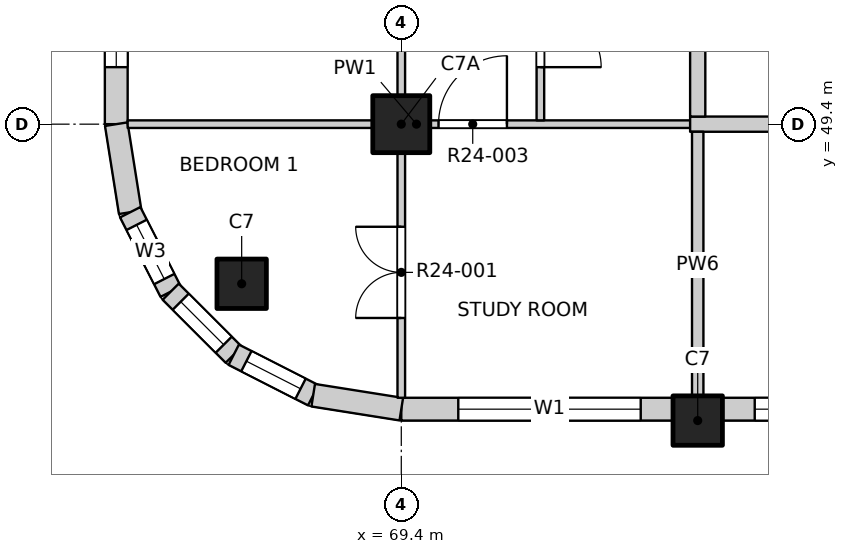
"""IFC4 building model, lengths in metres.
Left out: names, types, materials, properties, quantities, classifications, styles, units other than length and angle.
Written with IfcOpenShell. Run it as: python <this file> out.ifc"""

import sys

from ifc_helpers import new_model, si_unit, direction, frame, frame_2d, origin, origin_2d, place, context, subcontext, project, spatial, rectangle, extrude, element, fill, save


model = new_model("IFC4")
c1 = context("Model", 3, precision=1e-05, world=origin(), true_north=direction((0.0, 1.0)))
c2 = subcontext(c1, "Body", "Model", "MODEL_VIEW")
j1 = project(units=[si_unit("LENGTHUNIT", "METRE"), si_unit("PLANEANGLEUNIT", "RADIAN")], contexts=[c1])
p1 = place(None, origin())
s1 = spatial("IfcSite", under=j1, at=p1, CompositionType="ELEMENT")
p2 = place(p1, origin())
s2 = spatial("IfcBuilding", under=s1, at=p2, CompositionType="ELEMENT")
p3 = place(p2, frame((0.0, 0.0, 249.4)))
s3 = spatial("IfcBuildingStorey", under=s2, at=p3, CompositionType="ELEMENT", Elevation=249.4)
for number, where, z_axis, x_axis in (
    (1, (67.3, 47.3, -0.25), (0.0, 0.0, 1.0), (1.0, 0.0, 0.0)),
    (2, (73.3, 45.5, -0.25), (0.0, 0.0, 1.0), (1.0, 0.0, 0.0)),
):
    element("IfcColumn", number, at=place(p3, frame(where, z_axis=z_axis, x_axis=x_axis)), inside=s3, PredefinedType="COLUMN", context=c2, shape_type="SweptSolid", body=[
        extrude(rectangle(XDim=0.65, YDim=0.65, at=origin_2d()), origin(), (0.0, 0.0, 1.0), 3.4),
    ])
p4 = place(p3, frame((69.4, 49.4, -0.25), z_axis=(0.0, 0.0, 1.0), x_axis=(1.0, 0.0, 0.0)))
e3 = element("IfcColumn", 3, at=p4, inside=s3, PredefinedType="COLUMN", context=c2, shape_type="SweptSolid", body=[
    extrude(rectangle(XDim=0.75, YDim=0.75, at=origin_2d()), origin(), (0.0, 0.0, 1.0), 3.4),
])
p5 = place(p3, frame((69.4, 45.65, 0.0), z_axis=(0.0, 0.0, 1.0), x_axis=(1.0, 0.0, 0.0)))
e4 = element("IfcWall", 4, at=p5, inside=s3, PredefinedType="SOLIDWALL", context=c2, shape_type="SweptSolid", body=[
    extrude(rectangle(XDim=3.575, YDim=0.3, at=frame_2d((1.788, 0.0))), origin(), (0.0, 0.0, 1.0), 2.7),
])
p6 = place(p5, frame((0.75, 0.0, 0.9)))
e5 = element("IfcOpeningElement", 5, at=p6, cuts=e4, PredefinedType="OPENING", context=c2, shape_type="SweptSolid", body=[
    extrude(rectangle(XDim=2.4, YDim=1.8, at=frame_2d((1.2, 0.9))), frame((0.0, 0.16, 0.0), z_axis=(0.0, -1.0, 0.0), x_axis=(1.0, 0.0, 0.0)), (0.0, 0.0, 1.0), 0.32),
])
p7 = place(p3, frame((73.625, 45.65, 0.0), z_axis=(0.0, 0.0, 1.0), x_axis=(1.0, 0.0, 0.0)))
e6 = element("IfcWall", 6, at=p7, inside=s3, PredefinedType="SOLIDWALL", context=c2, shape_type="SweptSolid", body=[
    extrude(rectangle(XDim=7.15, YDim=0.3, at=frame_2d((3.575, 0.0))), origin(), (0.0, 0.0, 1.0), 2.7),
])
p8 = place(p7, frame((0.425, 0.0, 0.9)))
e7 = element("IfcOpeningElement", 7, at=p8, cuts=e6, PredefinedType="OPENING", context=c2, shape_type="SweptSolid", body=[
    extrude(rectangle(XDim=2.4, YDim=1.8, at=frame_2d((1.2, 0.9))), frame((0.0, 0.16, 0.0), z_axis=(0.0, -1.0, 0.0), x_axis=(1.0, 0.0, 0.0)), (0.0, 0.0, 1.0), 0.32),
])
p9 = place(p7, frame((4.325, 0.0, 0.9)))
e8 = element("IfcOpeningElement", 8, at=p9, cuts=e6, PredefinedType="OPENING", context=c2, shape_type="SweptSolid", body=[
    extrude(rectangle(XDim=2.4, YDim=1.8, at=frame_2d((1.2, 0.9))), frame((0.0, 0.16, 0.0), z_axis=(0.0, -1.0, 0.0), x_axis=(1.0, 0.0, 0.0)), (0.0, 0.0, 1.0), 0.32),
])
p10 = place(p3, frame((65.65, 49.4, 0.0), z_axis=(0.0, 0.0, 1.0), x_axis=(0.0, 1.0, 0.0)))
e9 = element("IfcWall", 9, at=p10, inside=s3, PredefinedType="SOLIDWALL", context=c2, shape_type="SweptSolid", body=[
    extrude(rectangle(XDim=3.575, YDim=0.3, at=frame_2d((1.788, 0.0))), origin(), (0.0, 0.0, 1.0), 2.7),
])
p11 = place(p10, frame((0.75, 0.0, 0.9)))
e10 = element("IfcOpeningElement", 10, at=p11, cuts=e9, PredefinedType="OPENING", context=c2, shape_type="SweptSolid", body=[
    extrude(rectangle(XDim=2.4, YDim=1.8, at=frame_2d((1.2, 0.9))), frame((0.0, 0.16, 0.0), z_axis=(0.0, -1.0, 0.0), x_axis=(1.0, 0.0, 0.0)), (0.0, 0.0, 1.0), 0.32),
])
p12 = place(p3, frame((65.65, 49.4, 0.0), z_axis=(0.0, 0.0, 1.0), x_axis=(0.156496880861, -0.987678452879, 0.0)))
e11 = element("IfcWall", 11, at=p12, inside=s3, PredefinedType="SOLIDWALL", context=c2, shape_type="SweptSolid", body=[
    extrude(rectangle(XDim=1.173, YDim=0.3, at=frame_2d((0.586, 0.0))), origin(), (0.0, 0.0, 1.0), 2.7),
])
p13 = place(p3, frame((65.833, 48.241, 0.0), z_axis=(0.0, 0.0, 1.0), x_axis=(0.454025524128, -0.890988677504, 0.0)))
e12 = element("IfcWall", 12, at=p13, inside=s3, PredefinedType="SOLIDWALL", context=c2, shape_type="SweptSolid", body=[
    extrude(rectangle(XDim=1.173, YDim=0.3, at=frame_2d((0.587, 0.0))), origin(), (0.0, 0.0, 1.0), 2.7),
])
p14 = place(p13, frame((0.187, 0.0, 0.9)))
e13 = element("IfcOpeningElement", 13, at=p14, cuts=e12, PredefinedType="OPENING", context=c2, shape_type="SweptSolid", body=[
    extrude(rectangle(XDim=0.8, YDim=1.2, at=frame_2d((0.4, 0.6))), frame((0.0, 0.16, 0.0), z_axis=(0.0, -1.0, 0.0), x_axis=(1.0, 0.0, 0.0)), (0.0, 0.0, 1.0), 0.32),
])
p15 = place(p3, frame((66.366, 47.196, 0.0), z_axis=(0.0, 0.0, 1.0), x_axis=(0.707106781187, -0.707106781187, 0.0)))
e14 = element("IfcWall", 14, at=p15, inside=s3, PredefinedType="SOLIDWALL", context=c2, shape_type="SweptSolid", body=[
    extrude(rectangle(XDim=1.173, YDim=0.3, at=frame_2d((0.586, 0.0))), origin(), (0.0, 0.0, 1.0), 2.7),
])
p16 = place(p15, frame((0.187, 0.0, 0.9)))
e15 = element("IfcOpeningElement", 15, at=p16, cuts=e14, PredefinedType="OPENING", context=c2, shape_type="SweptSolid", body=[
    extrude(rectangle(XDim=0.8, YDim=1.2, at=frame_2d((0.4, 0.6))), frame((0.0, 0.16, 0.0), z_axis=(0.0, -1.0, 0.0), x_axis=(1.0, 0.0, 0.0)), (0.0, 0.0, 1.0), 0.32),
])
p17 = place(p3, frame((67.196, 46.366, 0.0), z_axis=(0.0, 0.0, 1.0), x_axis=(0.890988677504, -0.454025524128, 0.0)))
e16 = element("IfcWall", 16, at=p17, inside=s3, PredefinedType="SOLIDWALL", context=c2, shape_type="SweptSolid", body=[
    extrude(rectangle(XDim=1.173, YDim=0.3, at=frame_2d((0.587, 0.0))), origin(), (0.0, 0.0, 1.0), 2.7),
])
p18 = place(p17, frame((0.187, 0.0, 0.9)))
e17 = element("IfcOpeningElement", 17, at=p18, cuts=e16, PredefinedType="OPENING", context=c2, shape_type="SweptSolid", body=[
    extrude(rectangle(XDim=0.8, YDim=1.2, at=frame_2d((0.4, 0.6))), frame((0.0, 0.16, 0.0), z_axis=(0.0, -1.0, 0.0), x_axis=(1.0, 0.0, 0.0)), (0.0, 0.0, 1.0), 0.32),
])
p19 = place(p3, frame((68.241, 45.833, 0.0), z_axis=(0.0, 0.0, 1.0), x_axis=(0.987678452879, -0.156496880861, 0.0)))
e18 = element("IfcWall", 18, at=p19, inside=s3, PredefinedType="SOLIDWALL", context=c2, shape_type="SweptSolid", body=[
    extrude(rectangle(XDim=1.173, YDim=0.3, at=frame_2d((0.586, 0.0))), origin(), (0.0, 0.0, 1.0), 2.7),
])
p20 = place(p3, frame((65.8, 49.4, 0.0), z_axis=(0.0, 0.0, 1.0), x_axis=(1.0, 0.0, 0.0)))
e19 = element("IfcWall", 19, at=p20, inside=s3, PredefinedType="PARTITIONING", context=c2, shape_type="SweptSolid", body=[
    extrude(rectangle(XDim=7.6, YDim=0.1, at=frame_2d((3.8, 0.0))), origin(), (0.0, 0.0, 1.0), 3.15),
])
p21 = place(p20, frame((4.09, 0.0, 0.0)))
e20 = element("IfcOpeningElement", 20, at=p21, cuts=e19, PredefinedType="OPENING", context=c2, shape_type="SweptSolid", body=[
    extrude(rectangle(XDim=0.9, YDim=2.1, at=frame_2d((0.45, 1.05))), frame((0.0, 0.06, 0.0), z_axis=(0.0, -1.0, 0.0), x_axis=(1.0, 0.0, 0.0)), (0.0, 0.0, 1.0), 0.12),
])
p22 = place(p3, frame((73.2, 49.4, 0.0), z_axis=(0.0, 0.0, 1.0), x_axis=(1.0, 0.0, 0.0)))
e21 = element("IfcWall", 21, at=p22, inside=s3, PredefinedType="PARTITIONING", context=c2, shape_type="SweptSolid", body=[
    extrude(rectangle(XDim=23.6, YDim=0.2, at=frame_2d((11.8, 0.0))), origin(), (0.0, 0.0, 1.0), 3.15),
])
p23 = place(p22, frame((7.3, 0.0, 0.0)))
e22 = element("IfcOpeningElement", 22, at=p23, cuts=e21, PredefinedType="OPENING", context=c2, shape_type="SweptSolid", body=[
    extrude(rectangle(XDim=1.2, YDim=2.1, at=frame_2d((0.6, 1.05))), frame((0.0, 0.11, 0.0), z_axis=(0.0, -1.0, 0.0), x_axis=(1.0, 0.0, 0.0)), (0.0, 0.0, 1.0), 0.22),
])
p24 = place(p22, frame((20.075, 0.0, 0.0)))
e23 = element("IfcOpeningElement", 23, at=p24, cuts=e21, PredefinedType="OPENING", context=c2, shape_type="SweptSolid", body=[
    extrude(rectangle(XDim=1.2, YDim=2.1, at=frame_2d((0.6, 1.05))), frame((0.0, 0.11, 0.0), z_axis=(0.0, -1.0, 0.0), x_axis=(1.0, 0.0, 0.0)), (0.0, 0.0, 1.0), 0.22),
])
p25 = place(p3, frame((69.4, 45.8, 0.0), z_axis=(0.0, 0.0, 1.0), x_axis=(0.0, 1.0, 0.0)))
e24 = element("IfcWall", 24, at=p25, inside=s3, PredefinedType="PARTITIONING", context=c2, shape_type="SweptSolid", body=[
    extrude(rectangle(XDim=38.4, YDim=0.1, at=frame_2d((19.2, 0.0))), origin(), (0.0, 0.0, 1.0), 3.15),
])
p26 = place(p25, frame((1.05, 0.0, 0.0)))
e25 = element("IfcOpeningElement", 25, at=p26, cuts=e24, PredefinedType="OPENING", context=c2, shape_type="SweptSolid", body=[
    extrude(rectangle(XDim=1.2, YDim=2.1, at=frame_2d((0.6, 1.05))), frame((0.0, 0.06, 0.0), z_axis=(0.0, -1.0, 0.0), x_axis=(1.0, 0.0, 0.0)), (0.0, 0.0, 1.0), 0.12),
])
p27 = place(p25, frame((5.1, 0.0, 0.0)))
e26 = element("IfcOpeningElement", 26, at=p27, cuts=e24, PredefinedType="OPENING", context=c2, shape_type="SweptSolid", body=[
    extrude(rectangle(XDim=0.9, YDim=2.1, at=frame_2d((0.45, 1.05))), frame((0.0, 0.06, 0.0), z_axis=(0.0, -1.0, 0.0), x_axis=(1.0, 0.0, 0.0)), (0.0, 0.0, 1.0), 0.12),
])
p28 = place(p25, frame((9.0, 0.0, 0.0)))
e27 = element("IfcOpeningElement", 27, at=p28, cuts=e24, PredefinedType="OPENING", context=c2, shape_type="SweptSolid", body=[
    extrude(rectangle(XDim=0.9, YDim=2.1, at=frame_2d((0.45, 1.05))), frame((0.0, 0.06, 0.0), z_axis=(0.0, -1.0, 0.0), x_axis=(1.0, 0.0, 0.0)), (0.0, 0.0, 1.0), 0.12),
])
p29 = place(p25, frame((12.9, 0.0, 0.0)))
e28 = element("IfcOpeningElement", 28, at=p29, cuts=e24, PredefinedType="OPENING", context=c2, shape_type="SweptSolid", body=[
    extrude(rectangle(XDim=0.9, YDim=2.1, at=frame_2d((0.45, 1.05))), frame((0.0, 0.06, 0.0), z_axis=(0.0, -1.0, 0.0), x_axis=(1.0, 0.0, 0.0)), (0.0, 0.0, 1.0), 0.12),
])
p30 = place(p25, frame((16.8, 0.0, 0.0)))
e29 = element("IfcOpeningElement", 29, at=p30, cuts=e24, PredefinedType="OPENING", context=c2, shape_type="SweptSolid", body=[
    extrude(rectangle(XDim=0.9, YDim=2.1, at=frame_2d((0.45, 1.05))), frame((0.0, 0.06, 0.0), z_axis=(0.0, -1.0, 0.0), x_axis=(1.0, 0.0, 0.0)), (0.0, 0.0, 1.0), 0.12),
])
p31 = place(p25, frame((20.7, 0.0, 0.0)))
e30 = element("IfcOpeningElement", 30, at=p31, cuts=e24, PredefinedType="OPENING", context=c2, shape_type="SweptSolid", body=[
    extrude(rectangle(XDim=0.9, YDim=2.1, at=frame_2d((0.45, 1.05))), frame((0.0, 0.06, 0.0), z_axis=(0.0, -1.0, 0.0), x_axis=(1.0, 0.0, 0.0)), (0.0, 0.0, 1.0), 0.12),
])
p32 = place(p25, frame((24.6, 0.0, 0.0)))
e31 = element("IfcOpeningElement", 31, at=p32, cuts=e24, PredefinedType="OPENING", context=c2, shape_type="SweptSolid", body=[
    extrude(rectangle(XDim=0.9, YDim=2.1, at=frame_2d((0.45, 1.05))), frame((0.0, 0.06, 0.0), z_axis=(0.0, -1.0, 0.0), x_axis=(1.0, 0.0, 0.0)), (0.0, 0.0, 1.0), 0.12),
])
p33 = place(p25, frame((30.3, 0.0, 0.0)))
e32 = element("IfcOpeningElement", 32, at=p33, cuts=e24, PredefinedType="OPENING", context=c2, shape_type="SweptSolid", body=[
    extrude(rectangle(XDim=1.2, YDim=2.1, at=frame_2d((0.6, 1.05))), frame((0.0, 0.06, 0.0), z_axis=(0.0, -1.0, 0.0), x_axis=(1.0, 0.0, 0.0)), (0.0, 0.0, 1.0), 0.12),
])
p34 = place(p25, frame((36.15, 0.0, 0.0)))
e33 = element("IfcOpeningElement", 33, at=p34, cuts=e24, PredefinedType="OPENING", context=c2, shape_type="SweptSolid", body=[
    extrude(rectangle(XDim=1.2, YDim=2.1, at=frame_2d((0.6, 1.05))), frame((0.0, 0.06, 0.0), z_axis=(0.0, -1.0, 0.0), x_axis=(1.0, 0.0, 0.0)), (0.0, 0.0, 1.0), 0.12),
])
p35 = place(p3, frame((71.23, 49.45, 0.0), z_axis=(0.0, 0.0, 1.0), x_axis=(0.0, 1.0, 0.0)))
e34 = element("IfcWall", 34, at=p35, inside=s3, PredefinedType="PARTITIONING", context=c2, shape_type="SweptSolid", body=[
    extrude(rectangle(XDim=4.5, YDim=0.1, at=frame_2d((2.25, 0.0))), origin(), (0.0, 0.0, 1.0), 3.15),
])
p36 = place(p35, frame((0.7, 0.0, 0.0)))
e35 = element("IfcOpeningElement", 35, at=p36, cuts=e34, PredefinedType="OPENING", context=c2, shape_type="SweptSolid", body=[
    extrude(rectangle(XDim=0.8, YDim=2.1, at=frame_2d((0.4, 1.05))), frame((0.0, 0.06, 0.0), z_axis=(0.0, -1.0, 0.0), x_axis=(1.0, 0.0, 0.0)), (0.0, 0.0, 1.0), 0.12),
])
p37 = place(p35, frame((3.0, 0.0, 0.0)))
e36 = element("IfcOpeningElement", 36, at=p37, cuts=e34, PredefinedType="OPENING", context=c2, shape_type="SweptSolid", body=[
    extrude(rectangle(XDim=0.8, YDim=2.1, at=frame_2d((0.4, 1.05))), frame((0.0, 0.06, 0.0), z_axis=(0.0, -1.0, 0.0), x_axis=(1.0, 0.0, 0.0)), (0.0, 0.0, 1.0), 0.12),
])
p38 = place(p3, frame((73.3, 45.8, 0.0), z_axis=(0.0, 0.0, 1.0), x_axis=(0.0, 1.0, 0.0)))
e37 = element("IfcWall", 37, at=p38, inside=s3, PredefinedType="PARTITIONING", context=c2, shape_type="SweptSolid", body=[
    extrude(rectangle(XDim=3.5, YDim=0.15, at=frame_2d((1.75, 0.0))), origin(), (0.0, 0.0, 1.0), 3.15),
])
p39 = place(p3, frame((73.3, 49.5, 0.0), z_axis=(0.0, 0.0, 1.0), x_axis=(0.0, 1.0, 0.0)))
e38 = element("IfcWall", 38, at=p39, inside=s3, PredefinedType="PARTITIONING", context=c2, shape_type="SweptSolid", body=[
    extrude(rectangle(XDim=34.7, YDim=0.2, at=frame_2d((17.35, 0.0))), origin(), (0.0, 0.0, 1.0), 3.15),
])
p40 = place(p39, frame((3.325, 0.0, 0.0)))
e39 = element("IfcOpeningElement", 39, at=p40, cuts=e38, PredefinedType="OPENING", context=c2, shape_type="SweptSolid", body=[
    extrude(rectangle(XDim=1.0, YDim=2.1, at=frame_2d((0.5, 1.05))), frame((0.0, 0.11, 0.0), z_axis=(0.0, -1.0, 0.0), x_axis=(1.0, 0.0, 0.0)), (0.0, 0.0, 1.0), 0.22),
])
p41 = place(p39, frame((17.875, 0.0, 0.0)))
e40 = element("IfcOpeningElement", 40, at=p41, cuts=e38, PredefinedType="OPENING", context=c2, shape_type="SweptSolid", body=[
    extrude(rectangle(XDim=1.0, YDim=2.1, at=frame_2d((0.5, 1.05))), frame((0.0, 0.11, 0.0), z_axis=(0.0, -1.0, 0.0), x_axis=(1.0, 0.0, 0.0)), (0.0, 0.0, 1.0), 0.22),
])
p42 = place(p39, frame((25.775, 0.0, 0.0)))
e41 = element("IfcOpeningElement", 41, at=p42, cuts=e38, PredefinedType="OPENING", context=c2, shape_type="SweptSolid", body=[
    extrude(rectangle(XDim=1.0, YDim=2.1, at=frame_2d((0.5, 1.05))), frame((0.0, 0.11, 0.0), z_axis=(0.0, -1.0, 0.0), x_axis=(1.0, 0.0, 0.0)), (0.0, 0.0, 1.0), 0.22),
])
p43 = place(p6, origin())
e42 = element("IfcWindow", 42, at=p43, inside=s3, PartitioningType="DOUBLE_PANEL_VERTICAL", PredefinedType="WINDOW", context=c2, shape_type="SweptSolid", body=[
    extrude(rectangle(XDim=2.4, YDim=1.8, at=frame_2d((1.2, 0.9))), frame((0.0, 0.03, 0.0), z_axis=(0.0, -1.0, 0.0), x_axis=(1.0, 0.0, 0.0)), (0.0, 0.0, 1.0), 0.06),
])
fill(e5, e42)
p44 = place(p8, origin())
e43 = element("IfcWindow", 43, at=p44, inside=s3, PartitioningType="DOUBLE_PANEL_VERTICAL", PredefinedType="WINDOW", context=c2, shape_type="SweptSolid", body=[
    extrude(rectangle(XDim=2.4, YDim=1.8, at=frame_2d((1.2, 0.9))), frame((0.0, 0.03, 0.0), z_axis=(0.0, -1.0, 0.0), x_axis=(1.0, 0.0, 0.0)), (0.0, 0.0, 1.0), 0.06),
])
fill(e7, e43)
p45 = place(p11, origin())
e44 = element("IfcWindow", 44, at=p45, inside=s3, PartitioningType="DOUBLE_PANEL_VERTICAL", PredefinedType="WINDOW", context=c2, shape_type="SweptSolid", body=[
    extrude(rectangle(XDim=2.4, YDim=1.8, at=frame_2d((1.2, 0.9))), frame((0.0, 0.03, 0.0), z_axis=(0.0, -1.0, 0.0), x_axis=(1.0, 0.0, 0.0)), (0.0, 0.0, 1.0), 0.06),
])
fill(e10, e44)
p46 = place(p14, origin())
e45 = element("IfcWindow", 45, at=p46, inside=s3, PartitioningType="SINGLE_PANEL", PredefinedType="WINDOW", context=c2, shape_type="SweptSolid", body=[
    extrude(rectangle(XDim=0.8, YDim=1.2, at=frame_2d((0.4, 0.6))), frame((0.0, 0.03, 0.0), z_axis=(0.0, -1.0, 0.0), x_axis=(1.0, 0.0, 0.0)), (0.0, 0.0, 1.0), 0.06),
])
fill(e13, e45)
p47 = place(p16, origin())
e46 = element("IfcWindow", 46, at=p47, inside=s3, PartitioningType="SINGLE_PANEL", PredefinedType="WINDOW", context=c2, shape_type="SweptSolid", body=[
    extrude(rectangle(XDim=0.8, YDim=1.2, at=frame_2d((0.4, 0.6))), frame((0.0, 0.03, 0.0), z_axis=(0.0, -1.0, 0.0), x_axis=(1.0, 0.0, 0.0)), (0.0, 0.0, 1.0), 0.06),
])
fill(e15, e46)
p48 = place(p18, origin())
e47 = element("IfcWindow", 47, at=p48, inside=s3, PartitioningType="SINGLE_PANEL", PredefinedType="WINDOW", context=c2, shape_type="SweptSolid", body=[
    extrude(rectangle(XDim=0.8, YDim=1.2, at=frame_2d((0.4, 0.6))), frame((0.0, 0.03, 0.0), z_axis=(0.0, -1.0, 0.0), x_axis=(1.0, 0.0, 0.0)), (0.0, 0.0, 1.0), 0.06),
])
fill(e17, e47)
p49 = place(p26, origin())
e48 = element("IfcDoor", 48, at=p49, inside=s3, OperationType="DOUBLE_DOOR_SINGLE_SWING", PredefinedType="DOOR", context=c2, shape_type="SweptSolid", body=[
    extrude(rectangle(XDim=1.2, YDim=2.1, at=frame_2d((0.6, 1.05))), frame((0.0, 0.025, 0.0), z_axis=(0.0, -1.0, 0.0), x_axis=(1.0, 0.0, 0.0)), (0.0, 0.0, 1.0), 0.05),
])
fill(e25, e48)
p50 = place(p21, origin())
e49 = element("IfcDoor", 49, at=p50, inside=s3, OperationType="SINGLE_SWING_RIGHT", PredefinedType="DOOR", context=c2, shape_type="SweptSolid", body=[
    extrude(rectangle(XDim=0.9, YDim=2.1, at=frame_2d((0.45, 1.05))), frame((0.0, 0.025, 0.0), z_axis=(0.0, -1.0, 0.0), x_axis=(1.0, 0.0, 0.0)), (0.0, 0.0, 1.0), 0.05),
])
fill(e20, e49)
p51 = place(p36, origin())
e50 = element("IfcDoor", 50, at=p51, inside=s3, OperationType="SINGLE_SWING_RIGHT", PredefinedType="DOOR", context=c2, shape_type="SweptSolid", body=[
    extrude(rectangle(XDim=0.8, YDim=2.1, at=frame_2d((0.4, 1.05))), frame((0.0, 0.025, 0.0), z_axis=(0.0, -1.0, 0.0), x_axis=(1.0, 0.0, 0.0)), (0.0, 0.0, 1.0), 0.05),
])
fill(e35, e50)
save(model, sys.argv[1])
